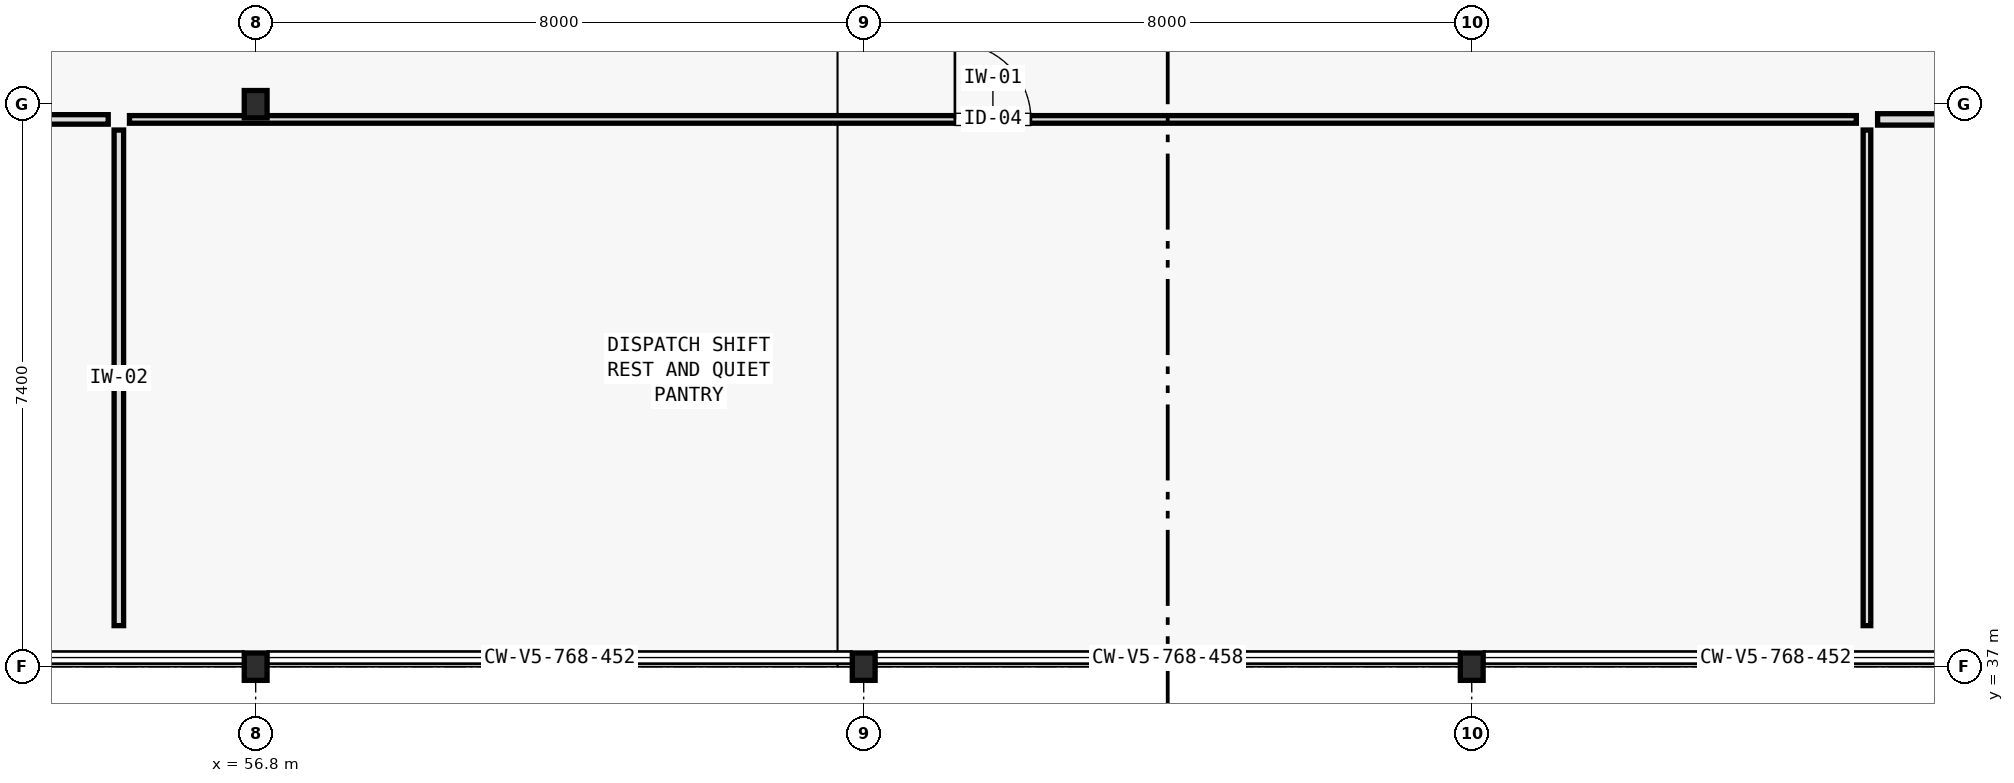
"""IFC4 building model, lengths in metres.
Left out: names, types, materials, properties, quantities, classifications, styles, units other than length and angle.
Written with IfcOpenShell. Run it as: python <this file> out.ifc"""

import sys

from ifc_helpers import new_model, si_unit, direction, frame, frame_2d, origin, origin_2d, place, context, subcontext, project, spatial, rectangle, i_section, extrude, element, fill, save


model = new_model("IFC4")
c1 = context("Model", 3, precision=1e-05, world=origin(), true_north=direction((0.0, 1.0)))
c2 = subcontext(c1, "Body", "Model", "MODEL_VIEW")
j1 = project(units=[si_unit("LENGTHUNIT", "METRE"), si_unit("PLANEANGLEUNIT", "RADIAN")], contexts=[c1])
p1 = place(None, origin())
s1 = spatial("IfcSite", under=j1, at=p1, CompositionType="ELEMENT")
p2 = place(p1, origin())
s2 = spatial("IfcBuilding", under=s1, at=p2, CompositionType="ELEMENT")
p3 = place(p2, frame((0.0, 0.0, 18.1)))
s3 = spatial("IfcBuildingStorey", under=s2, at=p3, CompositionType="ELEMENT", Elevation=18.1)
for number, where, z_axis, x_axis in (
    (1, (56.8, 37.0, 0.0), (0.0, 0.0, 1.0), (1.0, 0.0, 0.0)),
    (2, (56.8, 44.4, 0.0), (0.0, 0.0, 1.0), (1.0, 0.0, 0.0)),
    (3, (64.8, 37.0, 0.0), (0.0, 0.0, 1.0), (1.0, 0.0, 0.0)),
    (4, (72.8, 37.0, 0.0), (0.0, 0.0, 1.0), (1.0, 0.0, 0.0)),
):
    element("IfcColumn", number, at=place(p3, frame(where, z_axis=z_axis, x_axis=x_axis)), inside=s3, PredefinedType="COLUMN", context=c2, shape_type="SweptSolid", body=[
        extrude(i_section(OverallWidth=0.3, OverallDepth=0.36, WebThickness=0.012, FlangeThickness=0.022, FilletRadius=0.027, at=origin_2d()), origin(), (0.0, 0.0, 1.0), 5.2),
    ])
p4 = place(p3, frame((49.59, 44.2, 0.0), z_axis=(0.0, 0.0, 1.0), x_axis=(1.0, 0.0, 0.0)))
e5 = element("IfcWall", 5, at=p4, inside=s3, PredefinedType="PARTITIONING", context=c2, shape_type="SweptSolid", body=[
    extrude(rectangle(XDim=5.27, YDim=0.125, at=frame_2d((2.635, 0.0))), origin(), (0.0, 0.0, 1.0), 4.66),
])
p5 = place(p4, frame((2.11, 0.0, 0.0)))
e6 = element("IfcOpeningElement", 6, at=p5, cuts=e5, PredefinedType="OPENING", context=c2, shape_type="SweptSolid", body=[
    extrude(rectangle(XDim=1.05, YDim=2.1, at=frame_2d((0.525, 1.05))), frame((0.0, 0.073, 0.0), z_axis=(0.0, -1.0, 0.0), x_axis=(1.0, 0.0, 0.0)), (0.0, 0.0, 1.0), 0.145),
])
p6 = place(p3, frame((55.0, 37.54, 0.0), z_axis=(0.0, 0.0, 1.0), x_axis=(0.0, 1.0, 0.0)))
e7 = element("IfcWall", 7, at=p6, inside=s3, PredefinedType="PARTITIONING", context=c2, shape_type="SweptSolid", body=[
    extrude(rectangle(XDim=6.52, YDim=0.125, at=frame_2d((3.26, 0.0))), origin(), (0.0, 0.0, 1.0), 4.87),
])
p7 = place(p3, frame((55.14, 44.2, 0.0), z_axis=(0.0, 0.0, 1.0), x_axis=(1.0, 0.0, 0.0)))
e8 = element("IfcWall", 8, at=p7, inside=s3, PredefinedType="PARTITIONING", context=c2, shape_type="SweptSolid", body=[
    extrude(rectangle(XDim=22.72, YDim=0.1, at=frame_2d((11.36, 0.0))), origin(), (0.0, 0.0, 1.0), 4.51),
])
p8 = place(p7, frame((10.86, 0.0, 0.0)))
e9 = element("IfcOpeningElement", 9, at=p8, cuts=e8, PredefinedType="OPENING", context=c2, shape_type="SweptSolid", body=[
    extrude(rectangle(XDim=1.0, YDim=2.2, at=frame_2d((0.5, 1.1))), frame((0.0, 0.06, 0.0), z_axis=(0.0, -1.0, 0.0), x_axis=(1.0, 0.0, 0.0)), (0.0, 0.0, 1.0), 0.12),
])
p9 = place(p3, frame((78.0, 37.54, 0.0), z_axis=(0.0, 0.0, 1.0), x_axis=(0.0, 1.0, 0.0)))
e10 = element("IfcWall", 10, at=p9, inside=s3, PredefinedType="PARTITIONING", context=c2, shape_type="SweptSolid", body=[
    extrude(rectangle(XDim=6.52, YDim=0.1, at=frame_2d((3.26, 0.0))), origin(), (0.0, 0.0, 1.0), 4.87),
])
p10 = place(p3, frame((78.14, 44.2, 0.0), z_axis=(0.0, 0.0, 1.0), x_axis=(1.0, 0.0, 0.0)))
e11 = element("IfcWall", 11, at=p10, inside=s3, PredefinedType="PARTITIONING", context=c2, shape_type="SweptSolid", body=[
    extrude(rectangle(XDim=34.12, YDim=0.15, at=frame_2d((17.06, 0.0))), origin(), (0.0, 0.0, 1.0), 4.4),
])
p11 = place(p10, frame((21.478, 0.0, 0.0)))
e12 = element("IfcOpeningElement", 12, at=p11, cuts=e11, PredefinedType="OPENING", context=c2, shape_type="SweptSolid", body=[
    extrude(rectangle(XDim=1.4, YDim=2.2, at=frame_2d((0.7, 1.1))), frame((0.0, 0.085, 0.0), z_axis=(0.0, -1.0, 0.0), x_axis=(1.0, 0.0, 0.0)), (0.0, 0.0, 1.0), 0.17),
])
p12 = place(p8, origin())
e13 = element("IfcDoor", 13, at=p12, inside=s3, OperationType="SINGLE_SWING_LEFT", PredefinedType="DOOR", context=c2, shape_type="SweptSolid", body=[
    extrude(rectangle(XDim=1.0, YDim=2.2, at=frame_2d((0.5, 1.1))), frame((0.0, 0.025, 0.0), z_axis=(0.0, -1.0, 0.0), x_axis=(1.0, 0.0, 0.0)), (0.0, 0.0, 1.0), 0.05),
])
fill(e9, e13)
save(model, sys.argv[1])
